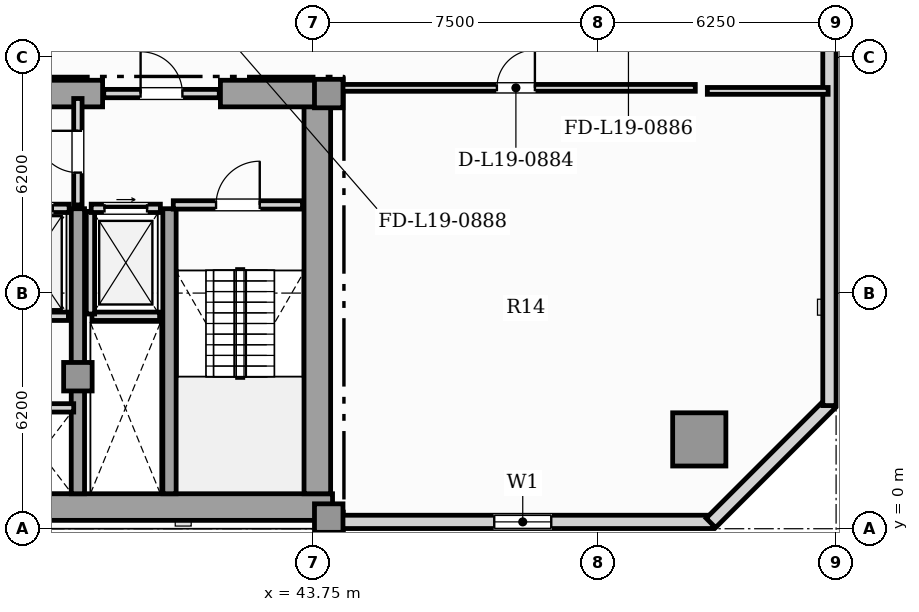
"""IFC4 building model, lengths in metres.
Left out: names, types, materials, properties, quantities, classifications, styles, units other than length and angle.
Written with IfcOpenShell. Run it as: python <this file> out.ifc"""

import sys

from ifc_helpers import new_model, si_unit, direction, frame, frame_2d, origin, origin_2d, place, context, subcontext, project, spatial, rectangle, hollow_rectangle, extrude, element, fill, save


model = new_model("IFC4")
c1 = context("Model", 3, precision=1e-05, world=origin(), true_north=direction((0.0, 1.0)))
c2 = subcontext(c1, "Body", "Model", "MODEL_VIEW")
j1 = project(units=[si_unit("LENGTHUNIT", "METRE"), si_unit("PLANEANGLEUNIT", "RADIAN")], contexts=[c1])
p1 = place(None, origin())
s1 = spatial("IfcSite", under=j1, at=p1, CompositionType="ELEMENT")
p2 = place(p1, origin())
s2 = spatial("IfcBuilding", under=s1, at=p2, CompositionType="ELEMENT")
p3 = place(p2, frame((0.0, 0.0, 81.05)))
s3 = spatial("IfcBuildingStorey", under=s2, at=p3, CompositionType="ELEMENT", Elevation=81.05)
p4 = place(p3, frame((13.25, 0.57, 0.0), z_axis=(0.0, 0.0, 1.0), x_axis=(1.0, 0.0, 0.0)))
e1 = element("IfcWall", 1, at=p4, inside=s3, PredefinedType="SHEAR", context=c2, shape_type="SweptSolid", body=[
    extrude(rectangle(XDim=31.0, YDim=0.7, at=frame_2d((15.5, 0.0))), origin(), (0.0, 0.0, 1.0), 3.6),
])
p5 = place(p3, frame((43.85, 0.92, 0.0), z_axis=(0.0, 0.0, 1.0), x_axis=(0.0, 1.0, 0.0)))
e2 = element("IfcWall", 2, at=p5, inside=s3, PredefinedType="SHEAR", context=c2, shape_type="SweptSolid", body=[
    extrude(rectangle(XDim=10.53, YDim=0.7, at=frame_2d((5.265, 0.0))), origin(), (0.0, 0.0, 1.0), 3.6),
])
p6 = place(p3, frame((30.9, 11.45, 0.0), z_axis=(0.0, 0.0, 1.0), x_axis=(1.0, 0.0, 0.0)))
e3 = element("IfcWall", 3, at=p6, inside=s3, PredefinedType="SHEAR", context=c2, shape_type="SweptSolid", body=[
    extrude(rectangle(XDim=7.3, YDim=0.7, at=frame_2d((3.65, 0.0))), origin(), (0.0, 0.0, 1.0), 3.6),
])
p7 = place(p3, frame((41.3, 11.45, 0.0), z_axis=(0.0, 0.0, 1.0), x_axis=(1.0, 0.0, 0.0)))
e4 = element("IfcWall", 4, at=p7, inside=s3, PredefinedType="SHEAR", context=c2, shape_type="SweptSolid", body=[
    extrude(rectangle(XDim=2.95, YDim=0.7, at=frame_2d((1.475, 0.0))), origin(), (0.0, 0.0, 1.0), 3.6),
])
for number, where, z_axis, x_axis in (
    (5, (37.55, 0.92, 0.0), (0.0, 0.0, 1.0), (0.0, 1.0, 0.0)),
    (6, (39.96, 0.92, 0.0), (0.0, 0.0, 1.0), (0.0, 1.0, 0.0)),
):
    element("IfcWall", number, at=place(p3, frame(where, z_axis=z_axis, x_axis=x_axis)), inside=s3, PredefinedType="SHEAR", context=c2, shape_type="SweptSolid", body=[
        extrude(rectangle(XDim=7.5, YDim=0.35, at=frame_2d((3.75, 0.0))), origin(), (0.0, 0.0, 1.0), 3.6),
    ])
for number, where, z_axis, x_axis in (
    (7, (44.15, 0.28, 0.0), (0.0, 0.0, 1.0), (1.0, 0.0, 0.0)),
    (8, (44.15, 11.45, 0.0), (0.0, 0.0, 1.0), (1.0, 0.0, 0.0)),
    (9, (37.55, 4.0, 0.0), (0.0, 0.0, 1.0), (1.0, 0.0, 0.0)),
):
    element("IfcColumn", number, at=place(p3, frame(where, z_axis=z_axis, x_axis=x_axis)), inside=s3, PredefinedType="COLUMN", context=c2, shape_type="SweptSolid", body=[
        extrude(rectangle(XDim=0.75, YDim=0.75, at=origin_2d()), origin(), (0.0, 0.0, 1.0), 3.85),
    ])
p8 = place(p3, frame((53.9, 2.35, 0.0), z_axis=(0.0, 0.0, 1.0), x_axis=(1.0, 0.0, 0.0)))
e10 = element("IfcColumn", 10, at=p8, inside=s3, PredefinedType="USERDEFINED", context=c2, shape_type="SweptSolid", body=[
    extrude(hollow_rectangle(XDim=1.4, YDim=1.4, WallThickness=0.08, at=origin_2d()), origin(), (0.0, 0.0, 1.0), 3.85),
])
p9 = place(p3, frame((44.25, 0.18, 0.0), z_axis=(0.0, 0.0, 1.0), x_axis=(1.0, 0.0, 0.0)))
e11 = element("IfcWall", 11, at=p9, inside=s3, PredefinedType="SOLIDWALL", context=c2, shape_type="SweptSolid", body=[
    extrude(rectangle(XDim=10.01, YDim=0.35, at=frame_2d((5.005, 0.0))), origin(), (0.0, 0.0, 1.0), 3.6),
])
p10 = place(p9, frame((4.255, 0.0, 0.9)))
e12 = element("IfcOpeningElement", 12, at=p10, cuts=e11, PredefinedType="OPENING", context=c2, shape_type="SweptSolid", body=[
    extrude(rectangle(XDim=1.5, YDim=1.95, at=frame_2d((0.75, 0.975))), frame((0.0, 0.185, 0.0), z_axis=(0.0, -1.0, 0.0), x_axis=(1.0, 0.0, 0.0)), (0.0, 0.0, 1.0), 0.37),
])
p11 = place(p3, frame((54.205, 0.152, 0.0), z_axis=(0.0, 0.0, 1.0), x_axis=(0.707106781187, 0.707106781187, 0.0)))
e13 = element("IfcWall", 13, at=p11, inside=s3, PredefinedType="SOLIDWALL", context=c2, shape_type="SweptSolid", body=[
    extrude(rectangle(XDim=4.445, YDim=0.35, at=frame_2d((2.223, 0.0))), origin(), (0.0, 0.0, 1.0), 3.6),
])
p12 = place(p3, frame((57.325, 3.24, 0.0), z_axis=(0.0, 0.0, 1.0), x_axis=(0.0, 1.0, 0.0)))
e14 = element("IfcWall", 14, at=p12, inside=s3, PredefinedType="SOLIDWALL", context=c2, shape_type="SweptSolid", body=[
    extrude(rectangle(XDim=39.92, YDim=0.35, at=frame_2d((19.96, 0.0))), origin(), (0.0, 0.0, 1.0), 3.6),
])
p13 = place(p12, frame((35.68, 0.0, 0.95)))
e15 = element("IfcOpeningElement", 15, at=p13, cuts=e14, PredefinedType="OPENING", context=c2, shape_type="SweptSolid", body=[
    extrude(rectangle(XDim=0.9, YDim=1.5, at=frame_2d((0.45, 0.75))), frame((0.0, 0.185, 0.0), z_axis=(0.0, -1.0, 0.0), x_axis=(1.0, 0.0, 0.0)), (0.0, 0.0, 1.0), 0.37),
])
p14 = place(p12, frame((11.882, 0.0, 0.9)))
e16 = element("IfcOpeningElement", 16, at=p14, cuts=e14, PredefinedType="OPENING", context=c2, shape_type="SweptSolid", body=[
    extrude(rectangle(XDim=1.5, YDim=1.95, at=frame_2d((0.75, 0.975))), frame((0.0, 0.185, 0.0), z_axis=(0.0, -1.0, 0.0), x_axis=(1.0, 0.0, 0.0)), (0.0, 0.0, 1.0), 0.37),
])
p15 = place(p12, frame((18.512, 0.0, 0.9)))
e17 = element("IfcOpeningElement", 17, at=p15, cuts=e14, PredefinedType="OPENING", context=c2, shape_type="SweptSolid", body=[
    extrude(rectangle(XDim=1.5, YDim=1.95, at=frame_2d((0.75, 0.975))), frame((0.0, 0.185, 0.0), z_axis=(0.0, -1.0, 0.0), x_axis=(1.0, 0.0, 0.0)), (0.0, 0.0, 1.0), 0.37),
])
p16 = place(p12, frame((28.834, 0.0, 0.9)))
e18 = element("IfcOpeningElement", 18, at=p16, cuts=e14, PredefinedType="OPENING", context=c2, shape_type="SweptSolid", body=[
    extrude(rectangle(XDim=1.5, YDim=1.95, at=frame_2d((0.75, 0.975))), frame((0.0, 0.185, 0.0), z_axis=(0.0, -1.0, 0.0), x_axis=(1.0, 0.0, 0.0)), (0.0, 0.0, 1.0), 0.37),
])
p17 = place(p12, frame((37.65, 0.0, 0.9)))
e19 = element("IfcOpeningElement", 19, at=p17, cuts=e14, PredefinedType="OPENING", context=c2, shape_type="SweptSolid", body=[
    extrude(rectangle(XDim=1.5, YDim=1.95, at=frame_2d((0.75, 0.975))), frame((0.0, 0.185, 0.0), z_axis=(0.0, -1.0, 0.0), x_axis=(1.0, 0.0, 0.0)), (0.0, 0.0, 1.0), 0.37),
])
p18 = place(p3, frame((37.92, 5.59, 0.0), z_axis=(0.0, 0.0, 1.0), x_axis=(1.0, 0.0, 0.0)))
e20 = element("IfcWall", 20, at=p18, inside=s3, PredefinedType="SOLIDWALL", context=c2, shape_type="SweptSolid", body=[
    extrude(rectangle(XDim=1.78, YDim=0.22, at=frame_2d((0.89, 0.0))), origin(), (0.0, 0.0, 1.0), 3.6),
])
p19 = place(p3, frame((37.88, 5.65, 0.0), z_axis=(0.0, 0.0, 1.0), x_axis=(0.0, 1.0, 0.0)))
e21 = element("IfcWall", 21, at=p19, inside=s3, PredefinedType="SOLIDWALL", context=c2, shape_type="SweptSolid", body=[
    extrude(rectangle(XDim=2.7, YDim=0.22, at=frame_2d((1.35, 0.0))), origin(), (0.0, 0.0, 1.0), 3.6),
])
p20 = place(p3, frame((37.9, 8.43, 0.0), z_axis=(0.0, 0.0, 1.0), x_axis=(1.0, 0.0, 0.0)))
e22 = element("IfcWall", 22, at=p20, inside=s3, PredefinedType="SOLIDWALL", context=c2, shape_type="SweptSolid", body=[
    extrude(rectangle(XDim=1.82, YDim=0.22, at=frame_2d((0.91, 0.0))), origin(), (0.0, 0.0, 1.0), 3.6),
])
p21 = place(p20, frame((0.35, 0.0, 0.0)))
e23 = element("IfcOpeningElement", 23, at=p21, cuts=e22, PredefinedType="OPENING", context=c2, shape_type="SweptSolid", body=[
    extrude(rectangle(XDim=1.12, YDim=2.25, at=frame_2d((0.56, 1.125))), frame((0.0, 0.12, 0.0), z_axis=(0.0, -1.0, 0.0), x_axis=(1.0, 0.0, 0.0)), (0.0, 0.0, 1.0), 0.24),
])
p22 = place(p3, frame((35.3, 5.59, 0.0), z_axis=(0.0, 0.0, 1.0), x_axis=(1.0, 0.0, 0.0)))
e24 = element("IfcWall", 24, at=p22, inside=s3, PredefinedType="SOLIDWALL", context=c2, shape_type="SweptSolid", body=[
    extrude(rectangle(XDim=2.0, YDim=0.22, at=frame_2d((1.0, 0.0))), origin(), (0.0, 0.0, 1.0), 3.6),
])
p23 = place(p3, frame((35.28, 8.43, 0.0), z_axis=(0.0, 0.0, 1.0), x_axis=(1.0, 0.0, 0.0)))
e25 = element("IfcWall", 25, at=p23, inside=s3, PredefinedType="SOLIDWALL", context=c2, shape_type="SweptSolid", body=[
    extrude(rectangle(XDim=2.04, YDim=0.22, at=frame_2d((1.02, 0.0))), origin(), (0.0, 0.0, 1.0), 3.6),
])
p24 = place(p23, frame((0.43, 0.0, 0.0)))
e26 = element("IfcOpeningElement", 26, at=p24, cuts=e25, PredefinedType="OPENING", context=c2, shape_type="SweptSolid", body=[
    extrude(rectangle(XDim=1.18, YDim=2.2, at=frame_2d((0.59, 1.1))), frame((0.0, 0.12, 0.0), z_axis=(0.0, -1.0, 0.0), x_axis=(1.0, 0.0, 0.0)), (0.0, 0.0, 1.0), 0.24),
])
p25 = place(p3, frame((35.7, 3.18, 0.0), z_axis=(0.0, 0.0, 1.0), x_axis=(1.0, 0.0, 0.0)))
e27 = element("IfcWall", 27, at=p25, inside=s3, PredefinedType="SOLIDWALL", context=c2, shape_type="SweptSolid", body=[
    extrude(rectangle(XDim=1.74, YDim=0.22, at=frame_2d((0.87, 0.0))), origin(), (0.0, 0.0, 1.0), 3.6),
])
p26 = place(p3, frame((40.06, 8.52, 0.0), z_axis=(0.0, 0.0, 1.0), x_axis=(1.0, 0.0, 0.0)))
e28 = element("IfcWall", 28, at=p26, inside=s3, PredefinedType="SOLIDWALL", context=c2, shape_type="SweptSolid", body=[
    extrude(rectangle(XDim=3.4, YDim=0.22, at=frame_2d((1.7, 0.0))), origin(), (0.0, 0.0, 1.0), 3.6),
])
p27 = place(p26, frame((1.125, 0.0, 0.0)))
e29 = element("IfcOpeningElement", 29, at=p27, cuts=e28, PredefinedType="OPENING", context=c2, shape_type="SweptSolid", body=[
    extrude(rectangle(XDim=1.15, YDim=2.2, at=frame_2d((0.575, 1.1))), frame((0.0, 0.12, 0.0), z_axis=(0.0, -1.0, 0.0), x_axis=(1.0, 0.0, 0.0)), (0.0, 0.0, 1.0), 0.24),
])
p28 = place(p3, frame((37.55, 8.52, 0.0), z_axis=(0.0, 0.0, 1.0), x_axis=(0.0, 1.0, 0.0)))
e30 = element("IfcWall", 30, at=p28, inside=s3, PredefinedType="SOLIDWALL", context=c2, shape_type="SweptSolid", body=[
    extrude(rectangle(XDim=2.8, YDim=0.22, at=frame_2d((1.4, 0.0))), origin(), (0.0, 0.0, 1.0), 3.055),
])
p29 = place(p28, frame((0.85, 0.0, 0.0)))
e31 = element("IfcOpeningElement", 31, at=p29, cuts=e30, PredefinedType="OPENING", context=c2, shape_type="SweptSolid", body=[
    extrude(rectangle(XDim=1.1, YDim=2.2, at=frame_2d((0.55, 1.1))), frame((0.0, 0.12, 0.0), z_axis=(0.0, -1.0, 0.0), x_axis=(1.0, 0.0, 0.0)), (0.0, 0.0, 1.0), 0.24),
])
p30 = place(p3, frame((38.23, 11.45, 0.0), z_axis=(0.0, 0.0, 1.0), x_axis=(1.0, 0.0, 0.0)))
e32 = element("IfcWall", 32, at=p30, inside=s3, PredefinedType="SOLIDWALL", context=c2, shape_type="SweptSolid", body=[
    extrude(rectangle(XDim=3.04, YDim=0.22, at=frame_2d((1.52, 0.0))), origin(), (0.0, 0.0, 1.0), 3.6),
])
p31 = place(p30, frame((0.97, 0.0, 0.0)))
e33 = element("IfcOpeningElement", 33, at=p31, cuts=e32, PredefinedType="OPENING", context=c2, shape_type="SweptSolid", body=[
    extrude(rectangle(XDim=1.1, YDim=2.2, at=frame_2d((0.55, 1.1))), frame((0.0, 0.12, 0.0), z_axis=(0.0, -1.0, 0.0), x_axis=(1.0, 0.0, 0.0)), (0.0, 0.0, 1.0), 0.24),
])
p32 = place(p3, frame((44.355, 11.6, 0.0), z_axis=(0.0, 0.0, 1.0), x_axis=(1.0, 0.0, 0.0)))
e34 = element("IfcWall", 34, at=p32, inside=s3, PredefinedType="PARTITIONING", context=c2, shape_type="SweptSolid", body=[
    extrude(rectangle(XDim=9.44, YDim=0.18, at=frame_2d((4.72, 0.0))), origin(), (0.0, 0.0, 1.0), 3.6),
])
p33 = place(p32, frame((4.22, 0.0, 0.0)))
e35 = element("IfcOpeningElement", 35, at=p33, cuts=e34, PredefinedType="OPENING", context=c2, shape_type="SweptSolid", body=[
    extrude(rectangle(XDim=1.0, YDim=2.15, at=frame_2d((0.5, 1.075))), frame((0.0, 0.1, 0.0), z_axis=(0.0, -1.0, 0.0), x_axis=(1.0, 0.0, 0.0)), (0.0, 0.0, 1.0), 0.2),
])
p34 = place(p3, frame((54.112, 11.52, 0.0), z_axis=(0.0, 0.0, 1.0), x_axis=(1.0, 0.0, 0.0)))
e36 = element("IfcWall", 36, at=p34, inside=s3, PredefinedType="PARTITIONING", context=c2, shape_type="SweptSolid", body=[
    extrude(rectangle(XDim=3.178, YDim=0.18, at=frame_2d((1.589, 0.0))), origin(), (0.0, 0.0, 1.0), 3.6),
])
p35 = place(p10, origin())
e37 = element("IfcWindow", 37, at=p35, inside=s3, PartitioningType="SINGLE_PANEL", PredefinedType="WINDOW", context=c2, shape_type="SweptSolid", body=[
    extrude(rectangle(XDim=1.5, YDim=1.95, at=frame_2d((0.75, 0.975))), frame((0.0, 0.03, 0.0), z_axis=(0.0, -1.0, 0.0), x_axis=(1.0, 0.0, 0.0)), (0.0, 0.0, 1.0), 0.06),
])
fill(e12, e37)
p36 = place(p21, origin())
e38 = element("IfcDoor", 38, at=p36, inside=s3, OperationType="SLIDING_TO_RIGHT", PredefinedType="DOOR", context=c2, shape_type="SweptSolid", body=[
    extrude(rectangle(XDim=1.12, YDim=2.25, at=frame_2d((0.56, 1.125))), frame((0.0, 0.025, 0.0), z_axis=(0.0, -1.0, 0.0), x_axis=(1.0, 0.0, 0.0)), (0.0, 0.0, 1.0), 0.05),
])
fill(e23, e38)
p37 = place(p24, origin())
e39 = element("IfcDoor", 39, at=p37, inside=s3, OperationType="SLIDING_TO_LEFT", PredefinedType="DOOR", context=c2, shape_type="SweptSolid", body=[
    extrude(rectangle(XDim=1.18, YDim=2.2, at=frame_2d((0.59, 1.1))), frame((0.0, 0.025, 0.0), z_axis=(0.0, -1.0, 0.0), x_axis=(1.0, 0.0, 0.0)), (0.0, 0.0, 1.0), 0.05),
])
fill(e26, e39)
p38 = place(p27, origin())
e40 = element("IfcDoor", 40, at=p38, inside=s3, OperationType="SINGLE_SWING_RIGHT", PredefinedType="DOOR", context=c2, shape_type="SweptSolid", body=[
    extrude(rectangle(XDim=1.15, YDim=2.2, at=frame_2d((0.575, 1.1))), frame((0.0, 0.025, 0.0), z_axis=(0.0, -1.0, 0.0), x_axis=(1.0, 0.0, 0.0)), (0.0, 0.0, 1.0), 0.05),
])
fill(e29, e40)
p39 = place(p29, origin())
e41 = element("IfcDoor", 41, at=p39, inside=s3, OperationType="SINGLE_SWING_RIGHT", PredefinedType="DOOR", context=c2, shape_type="SweptSolid", body=[
    extrude(rectangle(XDim=1.1, YDim=2.2, at=frame_2d((0.55, 1.1))), frame((0.0, 0.025, 0.0), z_axis=(0.0, -1.0, 0.0), x_axis=(1.0, 0.0, 0.0)), (0.0, 0.0, 1.0), 0.05),
])
fill(e31, e41)
p40 = place(p31, origin())
e42 = element("IfcDoor", 42, at=p40, inside=s3, OperationType="SINGLE_SWING_LEFT", PredefinedType="DOOR", context=c2, shape_type="SweptSolid", body=[
    extrude(rectangle(XDim=1.1, YDim=2.2, at=frame_2d((0.55, 1.1))), frame((0.0, 0.025, 0.0), z_axis=(0.0, -1.0, 0.0), x_axis=(1.0, 0.0, 0.0)), (0.0, 0.0, 1.0), 0.05),
])
fill(e33, e42)
p41 = place(p33, origin())
e43 = element("IfcDoor", 43, at=p41, inside=s3, OperationType="SINGLE_SWING_RIGHT", PredefinedType="DOOR", context=c2, shape_type="SweptSolid", body=[
    extrude(rectangle(XDim=1.0, YDim=2.15, at=frame_2d((0.5, 1.075))), frame((0.0, 0.025, 0.0), z_axis=(0.0, -1.0, 0.0), x_axis=(1.0, 0.0, 0.0)), (0.0, 0.0, 1.0), 0.05),
])
fill(e35, e43)
save(model, sys.argv[1])
